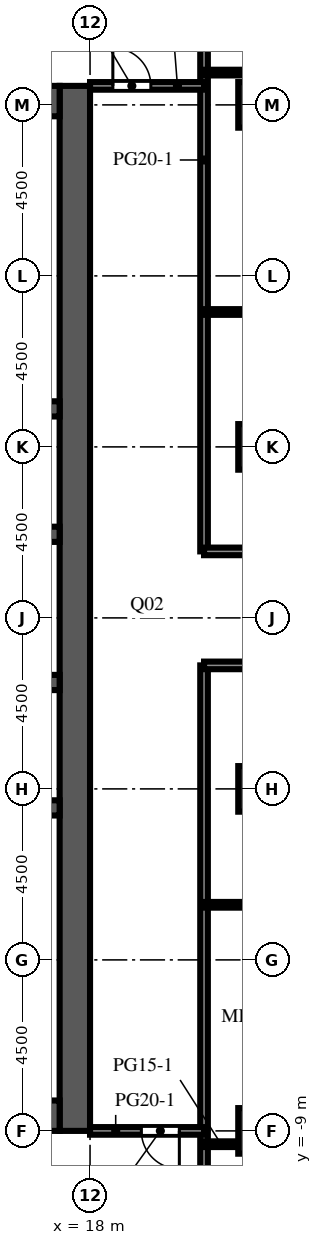
"""IFC4 building model, lengths in metres.
Left out: names, types, materials, properties, quantities, classifications, styles, units other than length and angle.
Written with IfcOpenShell. Run it as: python <this file> out.ifc"""

import sys

from ifc_helpers import new_model, si_unit, direction, frame, frame_2d, origin, origin_2d, place, context, subcontext, project, spatial, rectangle, extrude, element, fill, save


model = new_model("IFC4")
c1 = context("Model", 3, precision=1e-05, world=origin(), true_north=direction((0.0, 1.0)))
c2 = subcontext(c1, "Body", "Model", "MODEL_VIEW")
j1 = project(units=[si_unit("LENGTHUNIT", "METRE"), si_unit("PLANEANGLEUNIT", "RADIAN")], contexts=[c1])
p1 = place(None, origin())
s1 = spatial("IfcSite", under=j1, at=p1, CompositionType="ELEMENT")
p2 = place(p1, origin())
s2 = spatial("IfcBuilding", under=s1, at=p2, CompositionType="ELEMENT")
p3 = place(p2, frame((0.0, 0.0, 212.0)))
s3 = spatial("IfcBuildingStorey", under=s2, at=p3, CompositionType="ELEMENT", Elevation=212.0)
for number, where, z_axis, x_axis in (
    (1, (22.5, -9.0, 0.0), (0.0, 0.0, 1.0), (1.0, 0.0, 0.0)),
    (2, (22.5, 0.0, 0.0), (0.0, 0.0, 1.0), (1.0, 0.0, 0.0)),
    (3, (22.5, 9.0, 0.0), (0.0, 0.0, 1.0), (1.0, 0.0, 0.0)),
    (4, (22.5, 18.0, 0.0), (0.0, 0.0, 1.0), (1.0, 0.0, 0.0)),
):
    element("IfcColumn", number, at=place(p3, frame(where, z_axis=z_axis, x_axis=x_axis)), inside=s3, PredefinedType="COLUMN", context=c2, shape_type="SweptSolid", body=[
        extrude(rectangle(XDim=1.2, YDim=1.2, at=origin_2d()), origin(), (0.0, 0.0, 1.0), 4.1),
    ])
p4 = place(p3, frame((17.6, -9.0, 0.0), z_axis=(0.0, 0.0, 1.0), x_axis=(0.0, 1.0, 0.0)))
e5 = element("IfcWall", 5, at=p4, inside=s3, PredefinedType="SHEAR", context=c2, shape_type="SweptSolid", body=[
    extrude(rectangle(XDim=27.5, YDim=0.8, at=frame_2d((13.75, 0.0))), origin(), (0.0, 0.0, 1.0), 4.1),
])
p5 = place(p4, frame((12.55, 0.0, 0.0)))
e6 = element("IfcOpeningElement", 6, at=p5, cuts=e5, PredefinedType="OPENING", context=c2, shape_type="SweptSolid", body=[
    extrude(rectangle(XDim=2.4, YDim=2.4, at=frame_2d((1.2, 1.2))), frame((0.0, 0.41, 0.0), z_axis=(0.0, -1.0, 0.0), x_axis=(1.0, 0.0, 0.0)), (0.0, 0.0, 1.0), 0.82),
])
p6 = place(p4, frame((6.825, 0.0, 0.0)))
e7 = element("IfcOpeningElement", 7, at=p6, cuts=e5, PredefinedType="OPENING", context=c2, shape_type="SweptSolid", body=[
    extrude(rectangle(XDim=1.2, YDim=2.1, at=frame_2d((0.6, 1.05))), frame((0.0, 0.41, 0.0), z_axis=(0.0, -1.0, 0.0), x_axis=(1.0, 0.0, 0.0)), (0.0, 0.0, 1.0), 0.82),
])
p7 = place(p4, frame((19.475, 0.0, 0.0)))
e8 = element("IfcOpeningElement", 8, at=p7, cuts=e5, PredefinedType="OPENING", context=c2, shape_type="SweptSolid", body=[
    extrude(rectangle(XDim=1.2, YDim=2.1, at=frame_2d((0.6, 1.05))), frame((0.0, 0.41, 0.0), z_axis=(0.0, -1.0, 0.0), x_axis=(1.0, 0.0, 0.0)), (0.0, 0.0, 1.0), 0.82),
])
for number, where, z_axis, x_axis in (
    (9, (6.8, -8.6, 0.0), (0.0, 0.0, 1.0), (1.0, 0.0, 0.0)),
    (10, (6.8, 18.1, 0.0), (0.0, 0.0, 1.0), (1.0, 0.0, 0.0)),
):
    element("IfcWall", number, at=place(p3, frame(where, z_axis=z_axis, x_axis=x_axis)), inside=s3, PredefinedType="SHEAR", context=c2, shape_type="SweptSolid", body=[
        extrude(rectangle(XDim=10.4, YDim=0.8, at=frame_2d((5.2, 0.0))), origin(), (0.0, 0.0, 1.0), 4.1),
    ])
p8 = place(p3, frame((6.8, -0.5, 0.0), z_axis=(0.0, 0.0, 1.0), x_axis=(1.0, 0.0, 0.0)))
e11 = element("IfcWall", 11, at=p8, inside=s3, PredefinedType="SHEAR", context=c2, shape_type="SweptSolid", body=[
    extrude(rectangle(XDim=10.4, YDim=0.4, at=frame_2d((5.2, 0.0))), origin(), (0.0, 0.0, 1.0), 4.1),
])
p9 = place(p3, frame((6.8, 2.8, 0.0), z_axis=(0.0, 0.0, 1.0), x_axis=(1.0, 0.0, 0.0)))
e12 = element("IfcWall", 12, at=p9, inside=s3, PredefinedType="SHEAR", context=c2, shape_type="SweptSolid", body=[
    extrude(rectangle(XDim=10.4, YDim=0.4, at=frame_2d((5.2, 0.0))), origin(), (0.0, 0.0, 1.0), 4.1),
])
p10 = place(p9, frame((0.738, 0.0, 0.0)))
e13 = element("IfcOpeningElement", 13, at=p10, cuts=e12, PredefinedType="OPENING", context=c2, shape_type="SweptSolid", body=[
    extrude(rectangle(XDim=1.1, YDim=2.1, at=frame_2d((0.55, 1.05))), frame((0.0, 0.21, 0.0), z_axis=(0.0, -1.0, 0.0), x_axis=(1.0, 0.0, 0.0)), (0.0, 0.0, 1.0), 0.42),
])
p11 = place(p9, frame((3.337, 0.0, 0.0)))
e14 = element("IfcOpeningElement", 14, at=p11, cuts=e12, PredefinedType="OPENING", context=c2, shape_type="SweptSolid", body=[
    extrude(rectangle(XDim=1.1, YDim=2.1, at=frame_2d((0.55, 1.05))), frame((0.0, 0.21, 0.0), z_axis=(0.0, -1.0, 0.0), x_axis=(1.0, 0.0, 0.0)), (0.0, 0.0, 1.0), 0.42),
])
p12 = place(p9, frame((6.012, 0.0, 0.0)))
e15 = element("IfcOpeningElement", 15, at=p12, cuts=e12, PredefinedType="OPENING", context=c2, shape_type="SweptSolid", body=[
    extrude(rectangle(XDim=1.0, YDim=2.1, at=frame_2d((0.5, 1.05))), frame((0.0, 0.21, 0.0), z_axis=(0.0, -1.0, 0.0), x_axis=(1.0, 0.0, 0.0)), (0.0, 0.0, 1.0), 0.42),
])
p13 = place(p9, frame((8.613, 0.0, 0.0)))
e16 = element("IfcOpeningElement", 16, at=p13, cuts=e12, PredefinedType="OPENING", context=c2, shape_type="SweptSolid", body=[
    extrude(rectangle(XDim=1.0, YDim=2.1, at=frame_2d((0.5, 1.05))), frame((0.0, 0.21, 0.0), z_axis=(0.0, -1.0, 0.0), x_axis=(1.0, 0.0, 0.0)), (0.0, 0.0, 1.0), 0.42),
])
p14 = place(p3, frame((6.8, 6.7, 0.0), z_axis=(0.0, 0.0, 1.0), x_axis=(1.0, 0.0, 0.0)))
e17 = element("IfcWall", 17, at=p14, inside=s3, PredefinedType="SHEAR", context=c2, shape_type="SweptSolid", body=[
    extrude(rectangle(XDim=10.4, YDim=0.4, at=frame_2d((5.2, 0.0))), origin(), (0.0, 0.0, 1.0), 4.1),
])
p15 = place(p14, frame((3.337, 0.0, 0.0)))
e18 = element("IfcOpeningElement", 18, at=p15, cuts=e17, PredefinedType="OPENING", context=c2, shape_type="SweptSolid", body=[
    extrude(rectangle(XDim=1.1, YDim=2.1, at=frame_2d((0.55, 1.05))), frame((0.0, 0.21, 0.0), z_axis=(0.0, -1.0, 0.0), x_axis=(1.0, 0.0, 0.0)), (0.0, 0.0, 1.0), 0.42),
])
p16 = place(p14, frame((5.962, 0.0, 0.0)))
e19 = element("IfcOpeningElement", 19, at=p16, cuts=e17, PredefinedType="OPENING", context=c2, shape_type="SweptSolid", body=[
    extrude(rectangle(XDim=1.1, YDim=2.1, at=frame_2d((0.55, 1.05))), frame((0.0, 0.21, 0.0), z_axis=(0.0, -1.0, 0.0), x_axis=(1.0, 0.0, 0.0)), (0.0, 0.0, 1.0), 0.42),
])
p17 = place(p14, frame((8.663, 0.0, 0.0)))
e20 = element("IfcOpeningElement", 20, at=p17, cuts=e17, PredefinedType="OPENING", context=c2, shape_type="SweptSolid", body=[
    extrude(rectangle(XDim=1.1, YDim=2.1, at=frame_2d((0.55, 1.05))), frame((0.0, 0.21, 0.0), z_axis=(0.0, -1.0, 0.0), x_axis=(1.0, 0.0, 0.0)), (0.0, 0.0, 1.0), 0.42),
])
p18 = place(p14, frame((0.688, 0.0, 0.0)))
e21 = element("IfcOpeningElement", 21, at=p18, cuts=e17, PredefinedType="OPENING", context=c2, shape_type="SweptSolid", body=[
    extrude(rectangle(XDim=1.0, YDim=2.1, at=frame_2d((0.5, 1.05))), frame((0.0, 0.21, 0.0), z_axis=(0.0, -1.0, 0.0), x_axis=(1.0, 0.0, 0.0)), (0.0, 0.0, 1.0), 0.42),
])
p19 = place(p3, frame((6.8, 10.0, 0.0), z_axis=(0.0, 0.0, 1.0), x_axis=(1.0, 0.0, 0.0)))
e22 = element("IfcWall", 22, at=p19, inside=s3, PredefinedType="SHEAR", context=c2, shape_type="SweptSolid", body=[
    extrude(rectangle(XDim=10.4, YDim=0.4, at=frame_2d((5.2, 0.0))), origin(), (0.0, 0.0, 1.0), 4.1),
])
p20 = place(p3, frame((21.0, -26.85, 0.0), z_axis=(0.0, 0.0, 1.0), x_axis=(0.0, 1.0, 0.0)))
e23 = element("IfcWall", 23, at=p20, inside=s3, PredefinedType="PARTITIONING", context=c2, shape_type="SweptSolid", body=[
    extrude(rectangle(XDim=30.1, YDim=0.2, at=frame_2d((15.05, 0.0))), origin(), (0.0, 0.0, 1.0), 3.65),
])
p21 = place(p3, frame((21.0, 6.25, 0.0), z_axis=(0.0, 0.0, 1.0), x_axis=(0.0, 1.0, 0.0)))
e24 = element("IfcWall", 24, at=p21, inside=s3, PredefinedType="PARTITIONING", context=c2, shape_type="SweptSolid", body=[
    extrude(rectangle(XDim=20.6, YDim=0.2, at=frame_2d((10.3, 0.0))), origin(), (0.0, 0.0, 1.0), 3.65),
])
p22 = place(p3, frame((21.0, -9.35, 0.0), z_axis=(0.0, 0.0, 1.0), x_axis=(1.0, 0.0, 0.0)))
e25 = element("IfcWall", 25, at=p22, inside=s3, PredefinedType="PARTITIONING", context=c2, shape_type="SweptSolid", body=[
    extrude(rectangle(XDim=0.9, YDim=0.15, at=frame_2d((0.45, 0.0))), origin(), (0.0, 0.0, 1.0), 3.65),
])
p23 = place(p3, frame((21.0, -9.0, 0.0), z_axis=(0.0, 0.0, 1.0), x_axis=(-1.0, 0.0, 0.0)))
e26 = element("IfcWall", 26, at=p23, inside=s3, PredefinedType="PARTITIONING", context=c2, shape_type="SweptSolid", body=[
    extrude(rectangle(XDim=3.0, YDim=0.2, at=frame_2d((1.5, 0.0))), origin(), (0.0, 0.0, 1.0), 3.65),
])
p24 = place(p23, frame((0.65, 0.0, 0.0)))
e27 = element("IfcOpeningElement", 27, at=p24, cuts=e26, PredefinedType="OPENING", context=c2, shape_type="SweptSolid", body=[
    extrude(rectangle(XDim=1.0, YDim=2.1, at=frame_2d((0.5, 1.05))), frame((0.0, 0.11, 0.0), z_axis=(0.0, -1.0, 0.0), x_axis=(1.0, 0.0, 0.0)), (0.0, 0.0, 1.0), 0.22),
])
p25 = place(p3, frame((31.35, -3.05, 0.0), z_axis=(0.0, 0.0, 1.0), x_axis=(-1.0, 0.0, 0.0)))
e28 = element("IfcWall", 28, at=p25, inside=s3, PredefinedType="PARTITIONING", context=c2, shape_type="SweptSolid", body=[
    extrude(rectangle(XDim=10.35, YDim=0.15, at=frame_2d((5.175, 0.0))), origin(), (0.0, 0.0, 1.0), 3.65),
])
p26 = place(p25, frame((4.25, 0.0, 0.0)))
e29 = element("IfcOpeningElement", 29, at=p26, cuts=e28, PredefinedType="OPENING", context=c2, shape_type="SweptSolid", body=[
    extrude(rectangle(XDim=1.0, YDim=2.1, at=frame_2d((0.5, 1.05))), frame((0.0, 0.085, 0.0), z_axis=(0.0, -1.0, 0.0), x_axis=(1.0, 0.0, 0.0)), (0.0, 0.0, 1.0), 0.17),
])
p27 = place(p3, frame((31.35, 3.25, 0.0), z_axis=(0.0, 0.0, 1.0), x_axis=(-1.0, 0.0, 0.0)))
e30 = element("IfcWall", 30, at=p27, inside=s3, PredefinedType="PARTITIONING", context=c2, shape_type="SweptSolid", body=[
    extrude(rectangle(XDim=10.35, YDim=0.2, at=frame_2d((5.175, 0.0))), origin(), (0.0, 0.0, 1.0), 3.65),
])
p28 = place(p27, frame((5.5, 0.0, 0.0)))
e31 = element("IfcOpeningElement", 31, at=p28, cuts=e30, PredefinedType="OPENING", context=c2, shape_type="SweptSolid", body=[
    extrude(rectangle(XDim=1.0, YDim=2.1, at=frame_2d((0.5, 1.05))), frame((0.0, 0.11, 0.0), z_axis=(0.0, -1.0, 0.0), x_axis=(1.0, 0.0, 0.0)), (0.0, 0.0, 1.0), 0.22),
])
p29 = place(p3, frame((21.0, 6.25, 0.0), z_axis=(0.0, 0.0, 1.0), x_axis=(1.0, 0.0, 0.0)))
e32 = element("IfcWall", 32, at=p29, inside=s3, PredefinedType="PARTITIONING", context=c2, shape_type="SweptSolid", body=[
    extrude(rectangle(XDim=10.35, YDim=0.2, at=frame_2d((5.175, 0.0))), origin(), (0.0, 0.0, 1.0), 3.65),
])
p30 = place(p29, frame((5.6, 0.0, 0.0)))
e33 = element("IfcOpeningElement", 33, at=p30, cuts=e32, PredefinedType="OPENING", context=c2, shape_type="SweptSolid", body=[
    extrude(rectangle(XDim=1.0, YDim=2.1, at=frame_2d((0.5, 1.05))), frame((0.0, 0.11, 0.0), z_axis=(0.0, -1.0, 0.0), x_axis=(1.0, 0.0, 0.0)), (0.0, 0.0, 1.0), 0.22),
])
p31 = place(p3, frame((21.0, 12.55, 0.0), z_axis=(0.0, 0.0, 1.0), x_axis=(1.0, 0.0, 0.0)))
e34 = element("IfcWall", 34, at=p31, inside=s3, PredefinedType="PARTITIONING", context=c2, shape_type="SweptSolid", body=[
    extrude(rectangle(XDim=10.35, YDim=0.15, at=frame_2d((5.175, 0.0))), origin(), (0.0, 0.0, 1.0), 3.65),
])
p32 = place(p31, frame((4.6, 0.0, 0.0)))
e35 = element("IfcOpeningElement", 35, at=p32, cuts=e34, PredefinedType="OPENING", context=c2, shape_type="SweptSolid", body=[
    extrude(rectangle(XDim=1.0, YDim=2.1, at=frame_2d((0.5, 1.05))), frame((0.0, 0.085, 0.0), z_axis=(0.0, -1.0, 0.0), x_axis=(1.0, 0.0, 0.0)), (0.0, 0.0, 1.0), 0.17),
])
p33 = place(p3, frame((18.0, 18.5, 0.0), z_axis=(0.0, 0.0, 1.0), x_axis=(1.0, 0.0, 0.0)))
e36 = element("IfcWall", 36, at=p33, inside=s3, PredefinedType="PARTITIONING", context=c2, shape_type="SweptSolid", body=[
    extrude(rectangle(XDim=3.0, YDim=0.2, at=frame_2d((1.5, 0.0))), origin(), (0.0, 0.0, 1.0), 3.65),
])
p34 = place(p33, frame((0.6, 0.0, 0.0)))
e37 = element("IfcOpeningElement", 37, at=p34, cuts=e36, PredefinedType="OPENING", context=c2, shape_type="SweptSolid", body=[
    extrude(rectangle(XDim=1.0, YDim=2.1, at=frame_2d((0.5, 1.05))), frame((0.0, 0.11, 0.0), z_axis=(0.0, -1.0, 0.0), x_axis=(1.0, 0.0, 0.0)), (0.0, 0.0, 1.0), 0.22),
])
p35 = place(p3, frame((21.0, 18.85, 0.0), z_axis=(0.0, 0.0, 1.0), x_axis=(1.0, 0.0, 0.0)))
e38 = element("IfcWall", 38, at=p35, inside=s3, PredefinedType="PARTITIONING", context=c2, shape_type="SweptSolid", body=[
    extrude(rectangle(XDim=10.35, YDim=0.15, at=frame_2d((5.175, 0.0))), origin(), (0.0, 0.0, 1.0), 3.65),
])
p36 = place(p35, frame((6.85, 0.0, 0.0)))
e39 = element("IfcOpeningElement", 39, at=p36, cuts=e38, PredefinedType="OPENING", context=c2, shape_type="SweptSolid", body=[
    extrude(rectangle(XDim=1.0, YDim=2.1, at=frame_2d((0.5, 1.05))), frame((0.0, 0.085, 0.0), z_axis=(0.0, -1.0, 0.0), x_axis=(1.0, 0.0, 0.0)), (0.0, 0.0, 1.0), 0.17),
])
p37 = place(p5, origin())
e40 = element("IfcDoor", 40, at=p37, inside=s3, OperationType="DOUBLE_DOOR_DOUBLE_SWING", PredefinedType="DOOR", context=c2, shape_type="SweptSolid", body=[
    extrude(rectangle(XDim=2.4, YDim=2.4, at=frame_2d((1.2, 1.2))), frame((0.0, 0.025, 0.0), z_axis=(0.0, -1.0, 0.0), x_axis=(1.0, 0.0, 0.0)), (0.0, 0.0, 1.0), 0.05),
])
fill(e6, e40)
p38 = place(p6, frame((1.2, 0.0, 0.0), z_axis=(0.0, 0.0, 1.0), x_axis=(-1.0, 0.0, 0.0)))
e41 = element("IfcDoor", 41, at=p38, inside=s3, OperationType="SINGLE_SWING_LEFT", PredefinedType="DOOR", context=c2, shape_type="SweptSolid", body=[
    extrude(rectangle(XDim=1.2, YDim=2.1, at=frame_2d((0.6, 1.05))), frame((0.0, 0.025, 0.0), z_axis=(0.0, -1.0, 0.0), x_axis=(1.0, 0.0, 0.0)), (0.0, 0.0, 1.0), 0.05),
])
fill(e7, e41)
p39 = place(p7, frame((1.2, 0.0, 0.0), z_axis=(0.0, 0.0, 1.0), x_axis=(-1.0, 0.0, 0.0)))
e42 = element("IfcDoor", 42, at=p39, inside=s3, OperationType="SINGLE_SWING_LEFT", PredefinedType="DOOR", context=c2, shape_type="SweptSolid", body=[
    extrude(rectangle(XDim=1.2, YDim=2.1, at=frame_2d((0.6, 1.05))), frame((0.0, 0.025, 0.0), z_axis=(0.0, -1.0, 0.0), x_axis=(1.0, 0.0, 0.0)), (0.0, 0.0, 1.0), 0.05),
])
fill(e8, e42)
p40 = place(p24, origin())
e43 = element("IfcDoor", 43, at=p40, inside=s3, OperationType="SINGLE_SWING_LEFT", PredefinedType="DOOR", context=c2, shape_type="SweptSolid", body=[
    extrude(rectangle(XDim=1.0, YDim=2.1, at=frame_2d((0.5, 1.05))), frame((0.0, 0.025, 0.0), z_axis=(0.0, -1.0, 0.0), x_axis=(1.0, 0.0, 0.0)), (0.0, 0.0, 1.0), 0.05),
])
fill(e27, e43)
p41 = place(p34, origin())
e44 = element("IfcDoor", 44, at=p41, inside=s3, OperationType="SINGLE_SWING_LEFT", PredefinedType="DOOR", context=c2, shape_type="SweptSolid", body=[
    extrude(rectangle(XDim=1.0, YDim=2.1, at=frame_2d((0.5, 1.05))), frame((0.0, 0.025, 0.0), z_axis=(0.0, -1.0, 0.0), x_axis=(1.0, 0.0, 0.0)), (0.0, 0.0, 1.0), 0.05),
])
fill(e37, e44)
save(model, sys.argv[1])
